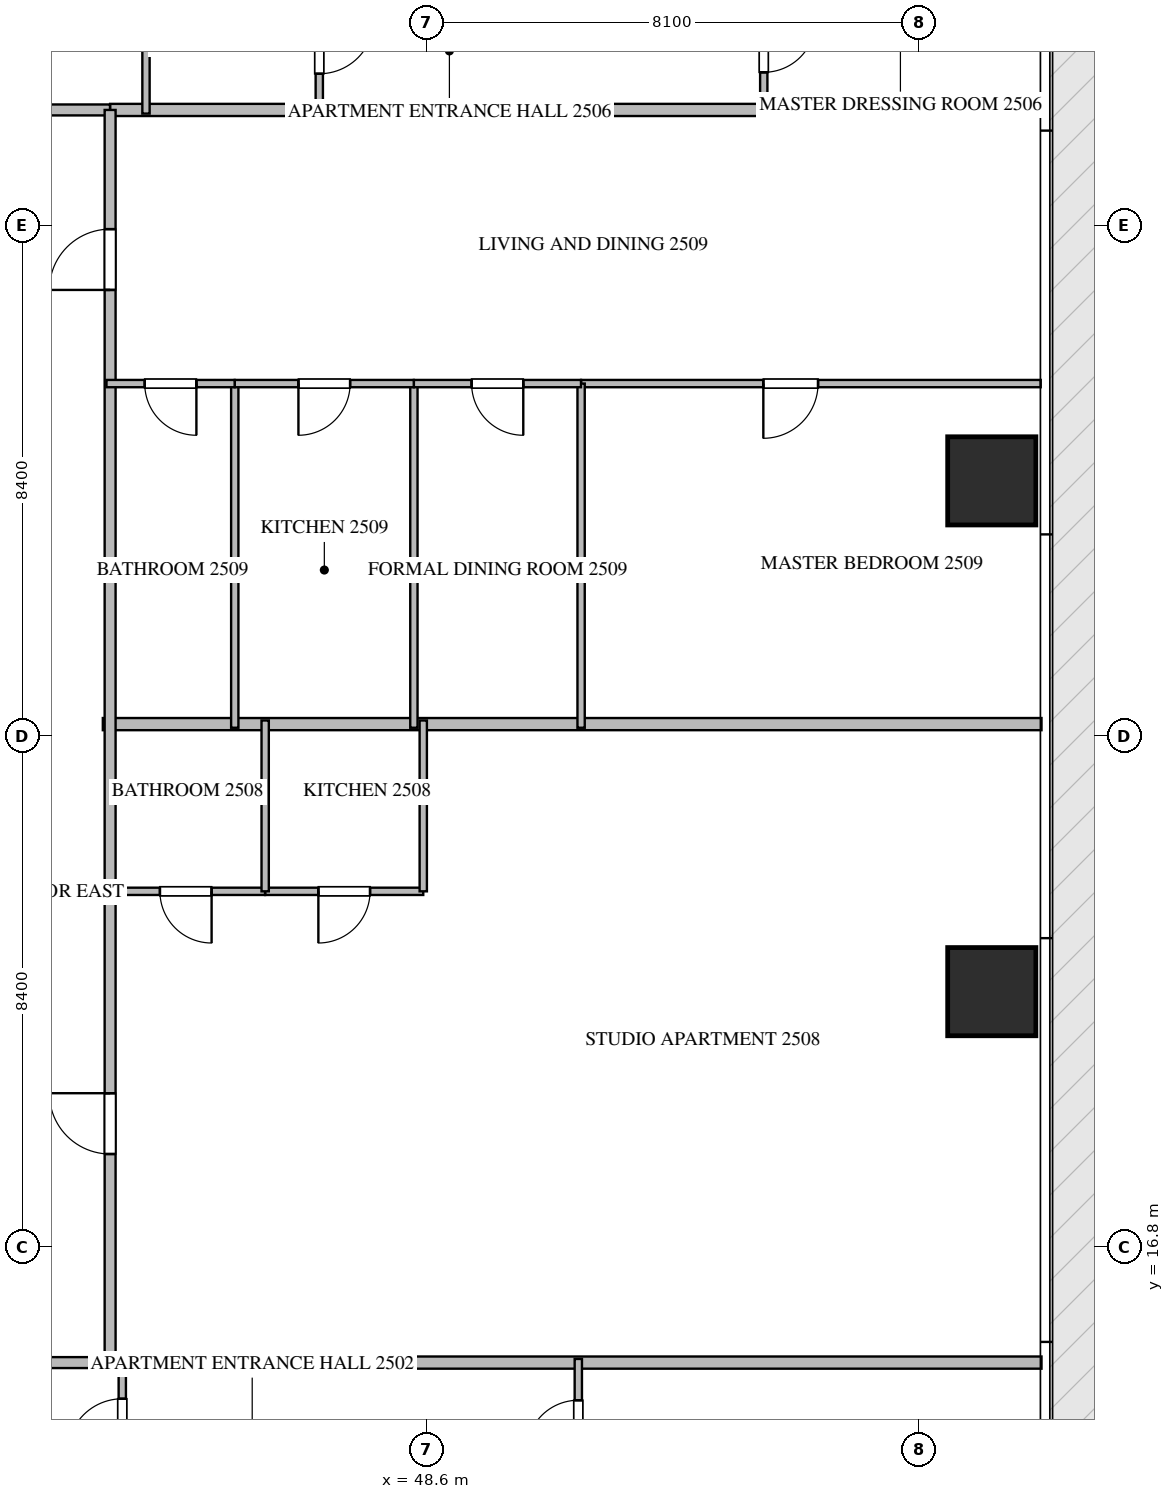
"""IFC4 building model, lengths in metres.
Left out: names, types, materials, properties, quantities, classifications, styles, units other than length and angle.
Written with IfcOpenShell. Run it as: python <this file> out.ifc"""

import sys

from ifc_helpers import new_model, si_unit, direction, frame, frame_2d, origin, origin_2d, place, context, subcontext, project, spatial, rectangle, extrude, source, transform, mapped, element, fill, save


model = new_model("IFC4")
c1 = context("Model", 3, precision=1e-05, world=origin(), true_north=direction((0.0, 1.0)))
c2 = subcontext(c1, "Body", "Model", "MODEL_VIEW")
j1 = project(units=[si_unit("LENGTHUNIT", "METRE"), si_unit("PLANEANGLEUNIT", "RADIAN")], contexts=[c1])
p1 = place(None, origin())
s1 = spatial("IfcSite", under=j1, at=p1, CompositionType="ELEMENT")
p2 = place(p1, origin())
s2 = spatial("IfcBuilding", under=s1, at=p2, CompositionType="ELEMENT")
p3 = place(p2, frame((0.0, 0.0, 101.7)))
s3 = spatial("IfcBuildingStorey", under=s2, at=p3, CompositionType="ELEMENT", Elevation=101.7)
m1 = source(origin(), c2, "Body", "SweptSolid", [
    extrude(rectangle(XDim=1.45, YDim=1.45, at=origin_2d()), origin(), (0.0, 0.0, 1.0), 3.75),
])
for number, where, z_axis, x_axis in (
    (1, (57.9, 21.0, -0.26), (0.0, 0.0, 1.0), (1.0, 0.0, 0.0)),
    (2, (57.9, 29.4, -0.26), (0.0, 0.0, 1.0), (1.0, 0.0, 0.0)),
):
    element("IfcColumn", number, at=place(p3, frame(where, z_axis=z_axis, x_axis=x_axis)), inside=s3, PredefinedType="COLUMN", context=c2, shape_type="MappedRepresentation", body=[
        mapped(m1, transform((0.0, 0.0, 0.0), scale=1.0)),
    ])
p4 = place(p3, frame((43.28, 25.4, 0.0), z_axis=(0.0, 0.0, 1.0), x_axis=(1.0, 0.0, 0.0)))
e3 = element("IfcWall", 3, at=p4, inside=s3, PredefinedType="PARTITIONING", context=c2, shape_type="SweptSolid", body=[
    extrude(rectangle(XDim=15.438, YDim=0.2, at=frame_2d((7.719, 0.0))), origin(), (0.0, 0.0, 1.0), 3.49),
])
for number, where, z_axis, x_axis in (
    (4, (43.4, 14.9, 0.0), (0.0, 0.0, 1.0), (1.0, 0.0, 0.0)),
    (5, (43.4, 35.5, 0.0), (0.0, 0.0, 1.0), (1.0, 0.0, 0.0)),
):
    element("IfcWall", number, at=place(p3, frame(where, z_axis=z_axis, x_axis=x_axis)), inside=s3, PredefinedType="PARTITIONING", context=c2, shape_type="SweptSolid", body=[
        extrude(rectangle(XDim=15.318, YDim=0.2, at=frame_2d((7.659, 0.0))), origin(), (0.0, 0.0, 1.0), 3.49),
    ])
p5 = place(p3, frame((21.402, 14.9, 0.0), z_axis=(0.0, 0.0, 1.0), x_axis=(1.0, 0.0, 0.0)))
e6 = element("IfcWall", 6, at=p5, inside=s3, PredefinedType="PARTITIONING", context=c2, shape_type="SweptSolid", body=[
    extrude(rectangle(XDim=21.996, YDim=0.18, at=frame_2d((10.998, 0.0))), origin(), (0.0, 0.0, 1.0), 3.49),
])
p6 = place(p5, frame((10.351, 0.0, 0.0)))
e7 = element("IfcOpeningElement", 7, at=p6, cuts=e6, PredefinedType="OPENING", context=c2, shape_type="SweptSolid", body=[
    extrude(rectangle(XDim=1.0, YDim=2.15, at=frame_2d((0.5, 1.075))), frame((0.0, 0.1, 0.0), z_axis=(0.0, -1.0, 0.0), x_axis=(1.0, 0.0, 0.0)), (0.0, 0.0, 1.0), 0.2),
])
p7 = place(p5, frame((15.978, 0.0, 0.0)))
e8 = element("IfcOpeningElement", 8, at=p7, cuts=e6, PredefinedType="OPENING", context=c2, shape_type="SweptSolid", body=[
    extrude(rectangle(XDim=1.0, YDim=2.15, at=frame_2d((0.5, 1.075))), frame((0.0, 0.1, 0.0), z_axis=(0.0, -1.0, 0.0), x_axis=(1.0, 0.0, 0.0)), (0.0, 0.0, 1.0), 0.2),
])
p8 = place(p3, frame((21.402, 35.5, 0.0), z_axis=(0.0, 0.0, 1.0), x_axis=(1.0, 0.0, 0.0)))
e9 = element("IfcWall", 9, at=p8, inside=s3, PredefinedType="PARTITIONING", context=c2, shape_type="SweptSolid", body=[
    extrude(rectangle(XDim=21.996, YDim=0.18, at=frame_2d((10.998, 0.0))), origin(), (0.0, 0.0, 1.0), 3.49),
])
p9 = place(p8, frame((1.96, 0.0, 0.0)))
e10 = element("IfcOpeningElement", 10, at=p9, cuts=e9, PredefinedType="OPENING", context=c2, shape_type="SweptSolid", body=[
    extrude(rectangle(XDim=1.0, YDim=2.15, at=frame_2d((0.5, 1.075))), frame((0.0, 0.1, 0.0), z_axis=(0.0, -1.0, 0.0), x_axis=(1.0, 0.0, 0.0)), (0.0, 0.0, 1.0), 0.2),
])
p10 = place(p8, frame((5.249, 0.0, 0.0)))
e11 = element("IfcOpeningElement", 11, at=p10, cuts=e9, PredefinedType="OPENING", context=c2, shape_type="SweptSolid", body=[
    extrude(rectangle(XDim=1.0, YDim=2.15, at=frame_2d((0.5, 1.075))), frame((0.0, 0.1, 0.0), z_axis=(0.0, -1.0, 0.0), x_axis=(1.0, 0.0, 0.0)), (0.0, 0.0, 1.0), 0.2),
])
p11 = place(p8, frame((11.653, 0.0, 0.0)))
e12 = element("IfcOpeningElement", 12, at=p11, cuts=e9, PredefinedType="OPENING", context=c2, shape_type="SweptSolid", body=[
    extrude(rectangle(XDim=1.0, YDim=2.15, at=frame_2d((0.5, 1.075))), frame((0.0, 0.1, 0.0), z_axis=(0.0, -1.0, 0.0), x_axis=(1.0, 0.0, 0.0)), (0.0, 0.0, 1.0), 0.2),
])
p12 = place(p8, frame((18.896, 0.0, 0.0)))
e13 = element("IfcOpeningElement", 13, at=p12, cuts=e9, PredefinedType="OPENING", context=c2, shape_type="SweptSolid", body=[
    extrude(rectangle(XDim=1.0, YDim=2.15, at=frame_2d((0.5, 1.075))), frame((0.0, 0.1, 0.0), z_axis=(0.0, -1.0, 0.0), x_axis=(1.0, 0.0, 0.0)), (0.0, 0.0, 1.0), 0.2),
])
p13 = place(p3, frame((43.4, 14.9, 0.0), z_axis=(0.0, 0.0, 1.0), x_axis=(0.0, 1.0, 0.0)))
e14 = element("IfcWall", 14, at=p13, inside=s3, PredefinedType="PARTITIONING", context=c2, shape_type="SweptSolid", body=[
    extrude(rectangle(XDim=20.6, YDim=0.18, at=frame_2d((10.3, 0.0))), origin(), (0.0, 0.0, 1.0), 3.49),
])
p14 = place(p13, frame((3.43, 0.0, 0.0)))
e15 = element("IfcOpeningElement", 15, at=p14, cuts=e14, PredefinedType="OPENING", context=c2, shape_type="SweptSolid", body=[
    extrude(rectangle(XDim=1.0, YDim=2.15, at=frame_2d((0.5, 1.075))), frame((0.0, 0.1, 0.0), z_axis=(0.0, -1.0, 0.0), x_axis=(1.0, 0.0, 0.0)), (0.0, 0.0, 1.0), 0.2),
])
p15 = place(p13, frame((17.64, 0.0, 0.0)))
e16 = element("IfcOpeningElement", 16, at=p15, cuts=e14, PredefinedType="OPENING", context=c2, shape_type="SweptSolid", body=[
    extrude(rectangle(XDim=1.0, YDim=2.15, at=frame_2d((0.5, 1.075))), frame((0.0, 0.1, 0.0), z_axis=(0.0, -1.0, 0.0), x_axis=(1.0, 0.0, 0.0)), (0.0, 0.0, 1.0), 0.2),
])
p16 = place(p3, frame((43.6, 12.75, 0.0), z_axis=(0.0, 0.0, 1.0), x_axis=(0.0, 1.0, 0.0)))
e17 = element("IfcWall", 17, at=p16, inside=s3, PredefinedType="PARTITIONING", context=c2, shape_type="SweptSolid", body=[
    extrude(rectangle(XDim=2.21, YDim=0.12, at=frame_2d((1.105, 0.0))), origin(), (0.0, 0.0, 1.0), 3.49),
])
p17 = place(p16, frame((0.655, 0.0, 0.0)))
e18 = element("IfcOpeningElement", 18, at=p17, cuts=e17, PredefinedType="OPENING", context=c2, shape_type="SweptSolid", body=[
    extrude(rectangle(XDim=0.9, YDim=2.1, at=frame_2d((0.45, 1.05))), frame((0.0, 0.07, 0.0), z_axis=(0.0, -1.0, 0.0), x_axis=(1.0, 0.0, 0.0)), (0.0, 0.0, 1.0), 0.14),
])
p18 = place(p3, frame((51.1, 12.752, 0.0), z_axis=(0.0, 0.0, 1.0), x_axis=(0.0, 1.0, 0.0)))
e19 = element("IfcWall", 19, at=p18, inside=s3, PredefinedType="PARTITIONING", context=c2, shape_type="SweptSolid", body=[
    extrude(rectangle(XDim=2.208, YDim=0.12, at=frame_2d((1.104, 0.0))), origin(), (0.0, 0.0, 1.0), 3.49),
])
p19 = place(p18, frame((0.679, 0.0, 0.0)))
e20 = element("IfcOpeningElement", 20, at=p19, cuts=e19, PredefinedType="OPENING", context=c2, shape_type="SweptSolid", body=[
    extrude(rectangle(XDim=0.85, YDim=2.1, at=frame_2d((0.425, 1.05))), frame((0.0, 0.07, 0.0), z_axis=(0.0, -1.0, 0.0), x_axis=(1.0, 0.0, 0.0)), (0.0, 0.0, 1.0), 0.14),
])
p20 = place(p3, frame((43.99, 38.25, 0.0), z_axis=(0.0, 0.0, 1.0), x_axis=(0.0, -1.0, 0.0)))
e21 = element("IfcWall", 21, at=p20, inside=s3, PredefinedType="PARTITIONING", context=c2, shape_type="SweptSolid", body=[
    extrude(rectangle(XDim=2.81, YDim=0.12, at=frame_2d((1.405, 0.0))), origin(), (0.0, 0.0, 1.0), 3.49),
])
p21 = place(p3, frame((46.84, 37.65, 0.0), z_axis=(0.0, 0.0, 1.0), x_axis=(0.0, -1.0, 0.0)))
e22 = element("IfcWall", 22, at=p21, inside=s3, PredefinedType="PARTITIONING", context=c2, shape_type="SweptSolid", body=[
    extrude(rectangle(XDim=2.21, YDim=0.12, at=frame_2d((1.105, 0.0))), origin(), (0.0, 0.0, 1.0), 3.49),
])
p22 = place(p21, frame((0.655, 0.0, 0.0)))
e23 = element("IfcOpeningElement", 23, at=p22, cuts=e22, PredefinedType="OPENING", context=c2, shape_type="SweptSolid", body=[
    extrude(rectangle(XDim=0.9, YDim=2.1, at=frame_2d((0.45, 1.05))), frame((0.0, 0.07, 0.0), z_axis=(0.0, -1.0, 0.0), x_axis=(1.0, 0.0, 0.0)), (0.0, 0.0, 1.0), 0.14),
])
p23 = place(p3, frame((54.15, 37.648, 0.0), z_axis=(0.0, 0.0, 1.0), x_axis=(0.0, -1.0, 0.0)))
e24 = element("IfcWall", 24, at=p23, inside=s3, PredefinedType="PARTITIONING", context=c2, shape_type="SweptSolid", body=[
    extrude(rectangle(XDim=2.208, YDim=0.12, at=frame_2d((1.104, 0.0))), origin(), (0.0, 0.0, 1.0), 3.49),
])
p24 = place(p23, frame((0.679, 0.0, 0.0)))
e25 = element("IfcOpeningElement", 25, at=p24, cuts=e24, PredefinedType="OPENING", context=c2, shape_type="SweptSolid", body=[
    extrude(rectangle(XDim=0.85, YDim=2.1, at=frame_2d((0.425, 1.05))), frame((0.0, 0.07, 0.0), z_axis=(0.0, -1.0, 0.0), x_axis=(1.0, 0.0, 0.0)), (0.0, 0.0, 1.0), 0.14),
])
p25 = place(p3, frame((48.55, 22.65, 0.0), z_axis=(0.0, 0.0, 1.0), x_axis=(-1.0, 0.0, 0.0)))
e26 = element("IfcWall", 26, at=p25, inside=s3, PredefinedType="PARTITIONING", context=c2, shape_type="SweptSolid", body=[
    extrude(rectangle(XDim=2.6, YDim=0.12, at=frame_2d((1.3, 0.0))), origin(), (0.0, 0.0, 1.0), 3.49),
])
p26 = place(p25, frame((0.875, 0.0, 0.0)))
e27 = element("IfcOpeningElement", 27, at=p26, cuts=e26, PredefinedType="OPENING", context=c2, shape_type="SweptSolid", body=[
    extrude(rectangle(XDim=0.85, YDim=2.1, at=frame_2d((0.425, 1.05))), frame((0.0, 0.07, 0.0), z_axis=(0.0, -1.0, 0.0), x_axis=(1.0, 0.0, 0.0)), (0.0, 0.0, 1.0), 0.14),
])
p27 = place(p3, frame((45.948, 22.65, 0.0), z_axis=(0.0, 0.0, 1.0), x_axis=(-1.0, 0.0, 0.0)))
e28 = element("IfcWall", 28, at=p27, inside=s3, PredefinedType="PARTITIONING", context=c2, shape_type="SweptSolid", body=[
    extrude(rectangle(XDim=2.608, YDim=0.12, at=frame_2d((1.304, 0.0))), origin(), (0.0, 0.0, 1.0), 3.49),
])
p28 = place(p27, frame((0.879, 0.0, 0.0)))
e29 = element("IfcOpeningElement", 29, at=p28, cuts=e28, PredefinedType="OPENING", context=c2, shape_type="SweptSolid", body=[
    extrude(rectangle(XDim=0.85, YDim=2.1, at=frame_2d((0.425, 1.05))), frame((0.0, 0.07, 0.0), z_axis=(0.0, -1.0, 0.0), x_axis=(1.0, 0.0, 0.0)), (0.0, 0.0, 1.0), 0.14),
])
for number, where, z_axis, x_axis in (
    (30, (45.95, 22.65, 0.0), (0.0, 0.0, 1.0), (0.0, 1.0, 0.0)),
    (31, (48.55, 22.65, 0.0), (0.0, 0.0, 1.0), (0.0, 1.0, 0.0)),
):
    element("IfcWall", number, at=place(p3, frame(where, z_axis=z_axis, x_axis=x_axis)), inside=s3, PredefinedType="PARTITIONING", context=c2, shape_type="SweptSolid", body=[
        extrude(rectangle(XDim=2.81, YDim=0.12, at=frame_2d((1.405, 0.0))), origin(), (0.0, 0.0, 1.0), 3.49),
    ])
p29 = place(p3, frame((58.705, 31.0, 0.0), z_axis=(0.0, 0.0, 1.0), x_axis=(-1.0, 0.0, 0.0)))
e32 = element("IfcWall", 32, at=p29, inside=s3, PredefinedType="PARTITIONING", context=c2, shape_type="SweptSolid", body=[
    extrude(rectangle(XDim=7.559, YDim=0.12, at=frame_2d((3.78, 0.0))), origin(), (0.0, 0.0, 1.0), 3.49),
])
p30 = place(p29, frame((3.662, 0.0, 0.0)))
e33 = element("IfcOpeningElement", 33, at=p30, cuts=e32, PredefinedType="OPENING", context=c2, shape_type="SweptSolid", body=[
    extrude(rectangle(XDim=0.9, YDim=2.1, at=frame_2d((0.45, 1.05))), frame((0.0, 0.07, 0.0), z_axis=(0.0, -1.0, 0.0), x_axis=(1.0, 0.0, 0.0)), (0.0, 0.0, 1.0), 0.14),
])
for number, where, z_axis, x_axis in (
    (34, (51.146, 25.34, 0.0), (0.0, 0.0, 1.0), (0.0, 1.0, 0.0)),
    (35, (48.396, 25.34, 0.0), (0.0, 0.0, 1.0), (0.0, 1.0, 0.0)),
    (36, (45.45, 25.34, 0.0), (0.0, 0.0, 1.0), (0.0, 1.0, 0.0)),
):
    element("IfcWall", number, at=place(p3, frame(where, z_axis=z_axis, x_axis=x_axis)), inside=s3, PredefinedType="PARTITIONING", context=c2, shape_type="SweptSolid", body=[
        extrude(rectangle(XDim=5.66, YDim=0.12, at=frame_2d((2.83, 0.0))), origin(), (0.0, 0.0, 1.0), 3.49),
    ])
p31 = place(p3, frame((51.144, 31.0, 0.0), z_axis=(0.0, 0.0, 1.0), x_axis=(-1.0, 0.0, 0.0)))
e37 = element("IfcWall", 37, at=p31, inside=s3, PredefinedType="PARTITIONING", context=c2, shape_type="SweptSolid", body=[
    extrude(rectangle(XDim=2.748, YDim=0.12, at=frame_2d((1.374, 0.0))), origin(), (0.0, 0.0, 1.0), 3.49),
])
p32 = place(p31, frame((0.949, 0.0, 0.0)))
e38 = element("IfcOpeningElement", 38, at=p32, cuts=e37, PredefinedType="OPENING", context=c2, shape_type="SweptSolid", body=[
    extrude(rectangle(XDim=0.85, YDim=2.1, at=frame_2d((0.425, 1.05))), frame((0.0, 0.07, 0.0), z_axis=(0.0, -1.0, 0.0), x_axis=(1.0, 0.0, 0.0)), (0.0, 0.0, 1.0), 0.14),
])
p33 = place(p3, frame((48.394, 31.0, 0.0), z_axis=(0.0, 0.0, 1.0), x_axis=(-1.0, 0.0, 0.0)))
e39 = element("IfcWall", 39, at=p33, inside=s3, PredefinedType="PARTITIONING", context=c2, shape_type="SweptSolid", body=[
    extrude(rectangle(XDim=2.944, YDim=0.12, at=frame_2d((1.472, 0.0))), origin(), (0.0, 0.0, 1.0), 3.49),
])
p34 = place(p33, frame((1.047, 0.0, 0.0)))
e40 = element("IfcOpeningElement", 40, at=p34, cuts=e39, PredefinedType="OPENING", context=c2, shape_type="SweptSolid", body=[
    extrude(rectangle(XDim=0.85, YDim=2.1, at=frame_2d((0.425, 1.05))), frame((0.0, 0.07, 0.0), z_axis=(0.0, -1.0, 0.0), x_axis=(1.0, 0.0, 0.0)), (0.0, 0.0, 1.0), 0.14),
])
p35 = place(p3, frame((45.448, 31.0, 0.0), z_axis=(0.0, 0.0, 1.0), x_axis=(-1.0, 0.0, 0.0)))
e41 = element("IfcWall", 41, at=p35, inside=s3, PredefinedType="PARTITIONING", context=c2, shape_type="SweptSolid", body=[
    extrude(rectangle(XDim=2.108, YDim=0.12, at=frame_2d((1.054, 0.0))), origin(), (0.0, 0.0, 1.0), 3.49),
])
p36 = place(p35, frame((0.629, 0.0, 0.0)))
e42 = element("IfcOpeningElement", 42, at=p36, cuts=e41, PredefinedType="OPENING", context=c2, shape_type="SweptSolid", body=[
    extrude(rectangle(XDim=0.85, YDim=2.1, at=frame_2d((0.425, 1.05))), frame((0.0, 0.07, 0.0), z_axis=(0.0, -1.0, 0.0), x_axis=(1.0, 0.0, 0.0)), (0.0, 0.0, 1.0), 0.14),
])
m2 = source(origin(), c2, "Body", "SweptSolid", [
    extrude(rectangle(XDim=1.0, YDim=2.15, at=frame_2d((0.5, 1.075))), frame((0.0, 0.025, 0.0), z_axis=(0.0, -1.0, 0.0), x_axis=(1.0, 0.0, 0.0)), (0.0, 0.0, 1.0), 0.05),
])
p37 = place(p14, origin())
e43 = element("IfcDoor", 43, at=p37, inside=s3, OperationType="SINGLE_SWING_RIGHT", PredefinedType="DOOR", context=c2, shape_type="MappedRepresentation", body=[
    mapped(m2, transform((0.0, 0.0, 0.0), scale=1.0)),
])
fill(e15, e43)
p38 = place(p15, origin())
e44 = element("IfcDoor", 44, at=p38, inside=s3, OperationType="SINGLE_SWING_LEFT", PredefinedType="DOOR", context=c2, shape_type="MappedRepresentation", body=[
    mapped(m2, transform((0.0, 0.0, 0.0), scale=1.0)),
])
fill(e16, e44)
m3 = source(origin(), c2, "Body", "SweptSolid", [
    extrude(rectangle(XDim=0.9, YDim=2.1, at=frame_2d((0.45, 1.05))), frame((0.0, 0.025, 0.0), z_axis=(0.0, -1.0, 0.0), x_axis=(1.0, 0.0, 0.0)), (0.0, 0.0, 1.0), 0.05),
])
p39 = place(p17, origin())
e45 = element("IfcDoor", 45, at=p39, inside=s3, OperationType="SINGLE_SWING_LEFT", PredefinedType="DOOR", context=c2, shape_type="MappedRepresentation", body=[
    mapped(m3, transform((0.0, 0.0, 0.0), scale=1.0)),
])
fill(e18, e45)
m4 = source(origin(), c2, "Body", "SweptSolid", [
    extrude(rectangle(XDim=0.85, YDim=2.1, at=frame_2d((0.425, 1.05))), frame((0.0, 0.025, 0.0), z_axis=(0.0, -1.0, 0.0), x_axis=(1.0, 0.0, 0.0)), (0.0, 0.0, 1.0), 0.05),
])
p40 = place(p19, origin())
e46 = element("IfcDoor", 46, at=p40, inside=s3, OperationType="SINGLE_SWING_LEFT", PredefinedType="DOOR", context=c2, shape_type="MappedRepresentation", body=[
    mapped(m4, transform((0.0, 0.0, 0.0), scale=1.0)),
])
fill(e20, e46)
p41 = place(p22, origin())
e47 = element("IfcDoor", 47, at=p41, inside=s3, OperationType="SINGLE_SWING_LEFT", PredefinedType="DOOR", context=c2, shape_type="MappedRepresentation", body=[
    mapped(m3, transform((0.0, 0.0, 0.0), scale=1.0)),
])
fill(e23, e47)
p42 = place(p24, origin())
e48 = element("IfcDoor", 48, at=p42, inside=s3, OperationType="SINGLE_SWING_LEFT", PredefinedType="DOOR", context=c2, shape_type="MappedRepresentation", body=[
    mapped(m4, transform((0.0, 0.0, 0.0), scale=1.0)),
])
fill(e25, e48)
p43 = place(p26, origin())
e49 = element("IfcDoor", 49, at=p43, inside=s3, OperationType="SINGLE_SWING_RIGHT", PredefinedType="DOOR", context=c2, shape_type="MappedRepresentation", body=[
    mapped(m4, transform((0.0, 0.0, 0.0), scale=1.0)),
])
fill(e27, e49)
p44 = place(p28, origin())
e50 = element("IfcDoor", 50, at=p44, inside=s3, OperationType="SINGLE_SWING_LEFT", PredefinedType="DOOR", context=c2, shape_type="MappedRepresentation", body=[
    mapped(m4, transform((0.0, 0.0, 0.0), scale=1.0)),
])
fill(e29, e50)
p45 = place(p30, origin())
e51 = element("IfcDoor", 51, at=p45, inside=s3, OperationType="SINGLE_SWING_RIGHT", PredefinedType="DOOR", context=c2, shape_type="MappedRepresentation", body=[
    mapped(m3, transform((0.0, 0.0, 0.0), scale=1.0)),
])
fill(e33, e51)
p46 = place(p32, origin())
e52 = element("IfcDoor", 52, at=p46, inside=s3, OperationType="SINGLE_SWING_LEFT", PredefinedType="DOOR", context=c2, shape_type="MappedRepresentation", body=[
    mapped(m4, transform((0.0, 0.0, 0.0), scale=1.0)),
])
fill(e38, e52)
p47 = place(p34, origin())
e53 = element("IfcDoor", 53, at=p47, inside=s3, OperationType="SINGLE_SWING_RIGHT", PredefinedType="DOOR", context=c2, shape_type="MappedRepresentation", body=[
    mapped(m4, transform((0.0, 0.0, 0.0), scale=1.0)),
])
fill(e40, e53)
p48 = place(p36, origin())
e54 = element("IfcDoor", 54, at=p48, inside=s3, OperationType="SINGLE_SWING_LEFT", PredefinedType="DOOR", context=c2, shape_type="MappedRepresentation", body=[
    mapped(m4, transform((0.0, 0.0, 0.0), scale=1.0)),
])
fill(e42, e54)
save(model, sys.argv[1])
